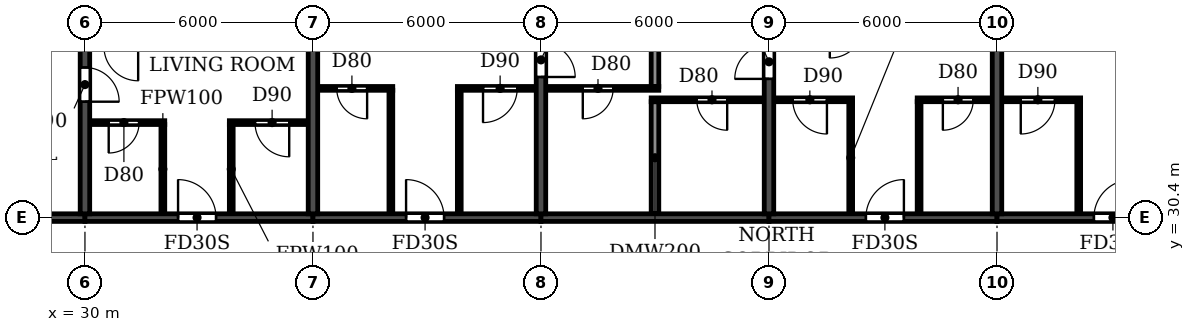
"""IFC4 building model, lengths in metres.
Left out: names, types, materials, properties, quantities, classifications, styles, units other than length and angle.
Written with IfcOpenShell. Run it as: python <this file> out.ifc"""

import sys

from ifc_helpers import new_model, si_unit, direction, frame, frame_2d, origin, place, context, subcontext, project, spatial, rectangle, extrude, element, fill, save


model = new_model("IFC4")
c1 = context("Model", 3, precision=1e-05, world=origin(), true_north=direction((0.0, 1.0)))
c2 = subcontext(c1, "Body", "Model", "MODEL_VIEW")
j1 = project(units=[si_unit("LENGTHUNIT", "METRE"), si_unit("PLANEANGLEUNIT", "RADIAN")], contexts=[c1])
p1 = place(None, origin())
s1 = spatial("IfcSite", under=j1, at=p1, CompositionType="ELEMENT")
p2 = place(p1, origin())
s2 = spatial("IfcBuilding", under=s1, at=p2, CompositionType="ELEMENT")
p3 = place(p2, frame((0.0, 0.0, 251.1)))
s3 = spatial("IfcBuildingStorey", under=s2, at=p3, CompositionType="ELEMENT", Elevation=251.1)
p4 = place(p3, frame((30.0, 30.5, 0.0), z_axis=(0.0, 0.0, 1.0), x_axis=(0.0, 1.0, 0.0)))
e1 = element("IfcWall", 1, at=p4, inside=s3, PredefinedType="SHEAR", context=c2, shape_type="SweptSolid", body=[
    extrude(rectangle(XDim=10.5, YDim=0.25, at=frame_2d((5.25, 0.0))), origin(), (0.0, 0.0, 1.0), 3.08),
])
p5 = place(p4, frame((2.95, 0.0, 0.0)))
e2 = element("IfcOpeningElement", 2, at=p5, cuts=e1, PredefinedType="OPENING", context=c2, shape_type="SweptSolid", body=[
    extrude(rectangle(XDim=0.9, YDim=2.1, at=frame_2d((0.45, 1.05))), frame((0.0, 0.135, 0.0), z_axis=(0.0, -1.0, 0.0), x_axis=(1.0, 0.0, 0.0)), (0.0, 0.0, 1.0), 0.27),
])
p6 = place(p3, frame((36.0, 30.5, 0.0), z_axis=(0.0, 0.0, 1.0), x_axis=(0.0, 1.0, 0.0)))
e3 = element("IfcWall", 3, at=p6, inside=s3, PredefinedType="SHEAR", context=c2, shape_type="SweptSolid", body=[
    extrude(rectangle(XDim=10.5, YDim=0.25, at=frame_2d((5.25, 0.0))), origin(), (0.0, 0.0, 1.0), 3.08),
])
p7 = place(p3, frame((42.0, 30.5, 0.0), z_axis=(0.0, 0.0, 1.0), x_axis=(0.0, 1.0, 0.0)))
e4 = element("IfcWall", 4, at=p7, inside=s3, PredefinedType="SHEAR", context=c2, shape_type="SweptSolid", body=[
    extrude(rectangle(XDim=10.5, YDim=0.25, at=frame_2d((5.25, 0.0))), origin(), (0.0, 0.0, 1.0), 3.08),
])
p8 = place(p7, frame((3.6, 0.0, 0.0)))
e5 = element("IfcOpeningElement", 5, at=p8, cuts=e4, PredefinedType="OPENING", context=c2, shape_type="SweptSolid", body=[
    extrude(rectangle(XDim=0.9, YDim=2.1, at=frame_2d((0.45, 1.05))), frame((0.0, 0.135, 0.0), z_axis=(0.0, -1.0, 0.0), x_axis=(1.0, 0.0, 0.0)), (0.0, 0.0, 1.0), 0.27),
])
p9 = place(p3, frame((48.0, 30.5, 0.0), z_axis=(0.0, 0.0, 1.0), x_axis=(0.0, 1.0, 0.0)))
e6 = element("IfcWall", 6, at=p9, inside=s3, PredefinedType="SHEAR", context=c2, shape_type="SweptSolid", body=[
    extrude(rectangle(XDim=10.5, YDim=0.25, at=frame_2d((5.25, 0.0))), origin(), (0.0, 0.0, 1.0), 3.08),
])
p10 = place(p9, frame((3.55, 0.0, 0.0)))
e7 = element("IfcOpeningElement", 7, at=p10, cuts=e6, PredefinedType="OPENING", context=c2, shape_type="SweptSolid", body=[
    extrude(rectangle(XDim=0.9, YDim=2.1, at=frame_2d((0.45, 1.05))), frame((0.0, 0.135, 0.0), z_axis=(0.0, -1.0, 0.0), x_axis=(1.0, 0.0, 0.0)), (0.0, 0.0, 1.0), 0.27),
])
p11 = place(p3, frame((54.0, 30.5, 0.0), z_axis=(0.0, 0.0, 1.0), x_axis=(0.0, 1.0, 0.0)))
e8 = element("IfcWall", 8, at=p11, inside=s3, PredefinedType="SHEAR", context=c2, shape_type="SweptSolid", body=[
    extrude(rectangle(XDim=10.5, YDim=0.25, at=frame_2d((5.25, 0.0))), origin(), (0.0, 0.0, 1.0), 3.08),
])
p12 = place(p3, frame((24.0, 30.4, 0.0), z_axis=(0.0, 0.0, 1.0), x_axis=(1.0, 0.0, 0.0)))
e9 = element("IfcWall", 9, at=p12, inside=s3, PredefinedType="SHEAR", context=c2, shape_type="SweptSolid", body=[
    extrude(rectangle(XDim=6.0, YDim=0.2, at=frame_2d((3.0, 0.0))), origin(), (0.0, 0.0, 1.0), 2.48),
])
p13 = place(p3, frame((30.0, 30.4, 0.0), z_axis=(0.0, 0.0, 1.0), x_axis=(1.0, 0.0, 0.0)))
e10 = element("IfcWall", 10, at=p13, inside=s3, PredefinedType="SHEAR", context=c2, shape_type="SweptSolid", body=[
    extrude(rectangle(XDim=6.0, YDim=0.2, at=frame_2d((3.0, 0.0))), origin(), (0.0, 0.0, 1.0), 2.48),
])
p14 = place(p13, frame((2.45, 0.0, 0.0)))
e11 = element("IfcOpeningElement", 11, at=p14, cuts=e10, PredefinedType="OPENING", context=c2, shape_type="SweptSolid", body=[
    extrude(rectangle(XDim=1.0, YDim=2.1, at=frame_2d((0.5, 1.05))), frame((0.0, 0.11, 0.0), z_axis=(0.0, -1.0, 0.0), x_axis=(1.0, 0.0, 0.0)), (0.0, 0.0, 1.0), 0.22),
])
p15 = place(p3, frame((36.0, 30.4, 0.0), z_axis=(0.0, 0.0, 1.0), x_axis=(1.0, 0.0, 0.0)))
e12 = element("IfcWall", 12, at=p15, inside=s3, PredefinedType="SHEAR", context=c2, shape_type="SweptSolid", body=[
    extrude(rectangle(XDim=6.0, YDim=0.2, at=frame_2d((3.0, 0.0))), origin(), (0.0, 0.0, 1.0), 2.48),
])
p16 = place(p15, frame((2.45, 0.0, 0.0)))
e13 = element("IfcOpeningElement", 13, at=p16, cuts=e12, PredefinedType="OPENING", context=c2, shape_type="SweptSolid", body=[
    extrude(rectangle(XDim=1.0, YDim=2.1, at=frame_2d((0.5, 1.05))), frame((0.0, 0.11, 0.0), z_axis=(0.0, -1.0, 0.0), x_axis=(1.0, 0.0, 0.0)), (0.0, 0.0, 1.0), 0.22),
])
p17 = place(p3, frame((42.0, 30.4, 0.0), z_axis=(0.0, 0.0, 1.0), x_axis=(1.0, 0.0, 0.0)))
e14 = element("IfcWall", 14, at=p17, inside=s3, PredefinedType="SHEAR", context=c2, shape_type="SweptSolid", body=[
    extrude(rectangle(XDim=6.0, YDim=0.2, at=frame_2d((3.0, 0.0))), origin(), (0.0, 0.0, 1.0), 2.48),
])
p18 = place(p3, frame((48.0, 30.4, 0.0), z_axis=(0.0, 0.0, 1.0), x_axis=(1.0, 0.0, 0.0)))
e15 = element("IfcWall", 15, at=p18, inside=s3, PredefinedType="SHEAR", context=c2, shape_type="SweptSolid", body=[
    extrude(rectangle(XDim=6.0, YDim=0.2, at=frame_2d((3.0, 0.0))), origin(), (0.0, 0.0, 1.0), 2.48),
])
p19 = place(p18, frame((2.55, 0.0, 0.0)))
e16 = element("IfcOpeningElement", 16, at=p19, cuts=e15, PredefinedType="OPENING", context=c2, shape_type="SweptSolid", body=[
    extrude(rectangle(XDim=1.0, YDim=2.1, at=frame_2d((0.5, 1.05))), frame((0.0, 0.11, 0.0), z_axis=(0.0, -1.0, 0.0), x_axis=(1.0, 0.0, 0.0)), (0.0, 0.0, 1.0), 0.22),
])
p20 = place(p3, frame((54.0, 30.4, 0.0), z_axis=(0.0, 0.0, 1.0), x_axis=(1.0, 0.0, 0.0)))
e17 = element("IfcWall", 17, at=p20, inside=s3, PredefinedType="SHEAR", context=c2, shape_type="SweptSolid", body=[
    extrude(rectangle(XDim=6.0, YDim=0.2, at=frame_2d((3.0, 0.0))), origin(), (0.0, 0.0, 1.0), 2.48),
])
p21 = place(p20, frame((2.55, 0.0, 0.0)))
e18 = element("IfcOpeningElement", 18, at=p21, cuts=e17, PredefinedType="OPENING", context=c2, shape_type="SweptSolid", body=[
    extrude(rectangle(XDim=1.0, YDim=2.1, at=frame_2d((0.5, 1.05))), frame((0.0, 0.11, 0.0), z_axis=(0.0, -1.0, 0.0), x_axis=(1.0, 0.0, 0.0)), (0.0, 0.0, 1.0), 0.22),
])
p22 = place(p3, frame((45.0, 30.51, 0.0), z_axis=(0.0, 0.0, 1.0), x_axis=(0.0, 1.0, 0.0)))
e19 = element("IfcWall", 19, at=p22, inside=s3, PredefinedType="PARTITIONING", context=c2, shape_type="SweptSolid", body=[
    extrude(rectangle(XDim=2.94, YDim=0.2, at=frame_2d((1.47, 0.0))), origin(), (0.0, 0.0, 1.0), 3.08),
])
p23 = place(p3, frame((45.0, 33.85, 0.0), z_axis=(0.0, 0.0, 1.0), x_axis=(0.0, 1.0, 0.0)))
e20 = element("IfcWall", 20, at=p23, inside=s3, PredefinedType="PARTITIONING", context=c2, shape_type="SweptSolid", body=[
    extrude(rectangle(XDim=7.29, YDim=0.2, at=frame_2d((3.645, 0.0))), origin(), (0.0, 0.0, 1.0), 3.08),
])
p24 = place(p3, frame((30.135, 32.9, 0.0), z_axis=(0.0, 0.0, 1.0), x_axis=(1.0, 0.0, 0.0)))
e21 = element("IfcWall", 21, at=p24, inside=s3, PredefinedType="PARTITIONING", context=c2, shape_type="SweptSolid", body=[
    extrude(rectangle(XDim=1.965, YDim=0.1, at=frame_2d((0.982, 0.0))), origin(), (0.0, 0.0, 1.0), 3.08),
])
p25 = place(p24, frame((0.49, 0.0, 0.0)))
e22 = element("IfcOpeningElement", 22, at=p25, cuts=e21, PredefinedType="OPENING", context=c2, shape_type="SweptSolid", body=[
    extrude(rectangle(XDim=0.8, YDim=2.1, at=frame_2d((0.4, 1.05))), frame((0.0, 0.06, 0.0), z_axis=(0.0, -1.0, 0.0), x_axis=(1.0, 0.0, 0.0)), (0.0, 0.0, 1.0), 0.12),
])
p26 = place(p3, frame((33.8, 32.9, 0.0), z_axis=(0.0, 0.0, 1.0), x_axis=(1.0, 0.0, 0.0)))
e23 = element("IfcWall", 23, at=p26, inside=s3, PredefinedType="PARTITIONING", context=c2, shape_type="SweptSolid", body=[
    extrude(rectangle(XDim=2.065, YDim=0.1, at=frame_2d((1.032, 0.0))), origin(), (0.0, 0.0, 1.0), 3.08),
])
p27 = place(p26, frame((0.675, 0.0, 0.0)))
e24 = element("IfcOpeningElement", 24, at=p27, cuts=e23, PredefinedType="OPENING", context=c2, shape_type="SweptSolid", body=[
    extrude(rectangle(XDim=0.9, YDim=2.1, at=frame_2d((0.45, 1.05))), frame((0.0, 0.06, 0.0), z_axis=(0.0, -1.0, 0.0), x_axis=(1.0, 0.0, 0.0)), (0.0, 0.0, 1.0), 0.12),
])
p28 = place(p3, frame((44.9, 33.5, 0.0), z_axis=(0.0, 0.0, 1.0), x_axis=(1.0, 0.0, 0.0)))
e25 = element("IfcWall", 25, at=p28, inside=s3, PredefinedType="PARTITIONING", context=c2, shape_type="SweptSolid", body=[
    extrude(rectangle(XDim=2.965, YDim=0.1, at=frame_2d((1.482, 0.0))), origin(), (0.0, 0.0, 1.0), 3.08),
])
p29 = place(p28, frame((1.2, 0.0, 0.0)))
e26 = element("IfcOpeningElement", 26, at=p29, cuts=e25, PredefinedType="OPENING", context=c2, shape_type="SweptSolid", body=[
    extrude(rectangle(XDim=0.8, YDim=2.1, at=frame_2d((0.4, 1.05))), frame((0.0, 0.06, 0.0), z_axis=(0.0, -1.0, 0.0), x_axis=(1.0, 0.0, 0.0)), (0.0, 0.0, 1.0), 0.12),
])
p30 = place(p3, frame((48.135, 33.5, 0.0), z_axis=(0.0, 0.0, 1.0), x_axis=(1.0, 0.0, 0.0)))
e27 = element("IfcWall", 27, at=p30, inside=s3, PredefinedType="PARTITIONING", context=c2, shape_type="SweptSolid", body=[
    extrude(rectangle(XDim=2.065, YDim=0.1, at=frame_2d((1.032, 0.0))), origin(), (0.0, 0.0, 1.0), 3.08),
])
p31 = place(p30, frame((0.49, 0.0, 0.0)))
e28 = element("IfcOpeningElement", 28, at=p31, cuts=e27, PredefinedType="OPENING", context=c2, shape_type="SweptSolid", body=[
    extrude(rectangle(XDim=0.9, YDim=2.1, at=frame_2d((0.45, 1.05))), frame((0.0, 0.06, 0.0), z_axis=(0.0, -1.0, 0.0), x_axis=(1.0, 0.0, 0.0)), (0.0, 0.0, 1.0), 0.12),
])
p32 = place(p3, frame((51.9, 33.5, 0.0), z_axis=(0.0, 0.0, 1.0), x_axis=(1.0, 0.0, 0.0)))
e29 = element("IfcWall", 29, at=p32, inside=s3, PredefinedType="PARTITIONING", context=c2, shape_type="SweptSolid", body=[
    extrude(rectangle(XDim=1.965, YDim=0.1, at=frame_2d((0.982, 0.0))), origin(), (0.0, 0.0, 1.0), 3.08),
])
p33 = place(p32, frame((0.675, 0.0, 0.0)))
e30 = element("IfcOpeningElement", 30, at=p33, cuts=e29, PredefinedType="OPENING", context=c2, shape_type="SweptSolid", body=[
    extrude(rectangle(XDim=0.8, YDim=2.1, at=frame_2d((0.4, 1.05))), frame((0.0, 0.06, 0.0), z_axis=(0.0, -1.0, 0.0), x_axis=(1.0, 0.0, 0.0)), (0.0, 0.0, 1.0), 0.12),
])
p34 = place(p3, frame((54.135, 33.5, 0.0), z_axis=(0.0, 0.0, 1.0), x_axis=(1.0, 0.0, 0.0)))
e31 = element("IfcWall", 31, at=p34, inside=s3, PredefinedType="PARTITIONING", context=c2, shape_type="SweptSolid", body=[
    extrude(rectangle(XDim=2.065, YDim=0.1, at=frame_2d((1.032, 0.0))), origin(), (0.0, 0.0, 1.0), 3.08),
])
p35 = place(p34, frame((0.49, 0.0, 0.0)))
e32 = element("IfcOpeningElement", 32, at=p35, cuts=e31, PredefinedType="OPENING", context=c2, shape_type="SweptSolid", body=[
    extrude(rectangle(XDim=0.9, YDim=2.1, at=frame_2d((0.45, 1.05))), frame((0.0, 0.06, 0.0), z_axis=(0.0, -1.0, 0.0), x_axis=(1.0, 0.0, 0.0)), (0.0, 0.0, 1.0), 0.12),
])
p36 = place(p3, frame((36.135, 33.8, 0.0), z_axis=(0.0, 0.0, 1.0), x_axis=(1.0, 0.0, 0.0)))
e33 = element("IfcWall", 33, at=p36, inside=s3, PredefinedType="PARTITIONING", context=c2, shape_type="SweptSolid", body=[
    extrude(rectangle(XDim=1.965, YDim=0.1, at=frame_2d((0.982, 0.0))), origin(), (0.0, 0.0, 1.0), 3.08),
])
p37 = place(p36, frame((0.49, 0.0, 0.0)))
e34 = element("IfcOpeningElement", 34, at=p37, cuts=e33, PredefinedType="OPENING", context=c2, shape_type="SweptSolid", body=[
    extrude(rectangle(XDim=0.8, YDim=2.1, at=frame_2d((0.4, 1.05))), frame((0.0, 0.06, 0.0), z_axis=(0.0, -1.0, 0.0), x_axis=(1.0, 0.0, 0.0)), (0.0, 0.0, 1.0), 0.12),
])
p38 = place(p3, frame((39.8, 33.8, 0.0), z_axis=(0.0, 0.0, 1.0), x_axis=(1.0, 0.0, 0.0)))
e35 = element("IfcWall", 35, at=p38, inside=s3, PredefinedType="PARTITIONING", context=c2, shape_type="SweptSolid", body=[
    extrude(rectangle(XDim=2.065, YDim=0.1, at=frame_2d((1.032, 0.0))), origin(), (0.0, 0.0, 1.0), 3.08),
])
p39 = place(p38, frame((0.675, 0.0, 0.0)))
e36 = element("IfcOpeningElement", 36, at=p39, cuts=e35, PredefinedType="OPENING", context=c2, shape_type="SweptSolid", body=[
    extrude(rectangle(XDim=0.9, YDim=2.1, at=frame_2d((0.45, 1.05))), frame((0.0, 0.06, 0.0), z_axis=(0.0, -1.0, 0.0), x_axis=(1.0, 0.0, 0.0)), (0.0, 0.0, 1.0), 0.12),
])
p40 = place(p3, frame((42.135, 33.8, 0.0), z_axis=(0.0, 0.0, 1.0), x_axis=(1.0, 0.0, 0.0)))
e37 = element("IfcWall", 37, at=p40, inside=s3, PredefinedType="PARTITIONING", context=c2, shape_type="SweptSolid", body=[
    extrude(rectangle(XDim=2.965, YDim=0.1, at=frame_2d((1.482, 0.0))), origin(), (0.0, 0.0, 1.0), 3.08),
])
p41 = place(p40, frame((0.965, 0.0, 0.0)))
e38 = element("IfcOpeningElement", 38, at=p41, cuts=e37, PredefinedType="OPENING", context=c2, shape_type="SweptSolid", body=[
    extrude(rectangle(XDim=0.8, YDim=2.1, at=frame_2d((0.4, 1.05))), frame((0.0, 0.06, 0.0), z_axis=(0.0, -1.0, 0.0), x_axis=(1.0, 0.0, 0.0)), (0.0, 0.0, 1.0), 0.12),
])
for number, where, z_axis, x_axis in (
    (39, (32.05, 30.51, 0.0), (0.0, 0.0, 1.0), (0.0, 1.0, 0.0)),
    (40, (33.85, 30.51, 0.0), (0.0, 0.0, 1.0), (0.0, 1.0, 0.0)),
):
    element("IfcWall", number, at=place(p3, frame(where, z_axis=z_axis, x_axis=x_axis)), inside=s3, PredefinedType="PARTITIONING", context=c2, shape_type="SweptSolid", body=[
        extrude(rectangle(XDim=2.34, YDim=0.1, at=frame_2d((1.17, 0.0))), origin(), (0.0, 0.0, 1.0), 3.08),
    ])
for number, where, z_axis, x_axis in (
    (41, (38.05, 30.51, 0.0), (0.0, 0.0, 1.0), (0.0, 1.0, 0.0)),
    (42, (39.85, 30.51, 0.0), (0.0, 0.0, 1.0), (0.0, 1.0, 0.0)),
):
    element("IfcWall", number, at=place(p3, frame(where, z_axis=z_axis, x_axis=x_axis)), inside=s3, PredefinedType="PARTITIONING", context=c2, shape_type="SweptSolid", body=[
        extrude(rectangle(XDim=3.24, YDim=0.1, at=frame_2d((1.62, 0.0))), origin(), (0.0, 0.0, 1.0), 3.08),
    ])
for number, where, z_axis, x_axis in (
    (43, (50.15, 30.51, 0.0), (0.0, 0.0, 1.0), (0.0, 1.0, 0.0)),
    (44, (51.95, 30.51, 0.0), (0.0, 0.0, 1.0), (0.0, 1.0, 0.0)),
    (45, (56.15, 30.51, 0.0), (0.0, 0.0, 1.0), (0.0, 1.0, 0.0)),
):
    element("IfcWall", number, at=place(p3, frame(where, z_axis=z_axis, x_axis=x_axis)), inside=s3, PredefinedType="PARTITIONING", context=c2, shape_type="SweptSolid", body=[
        extrude(rectangle(XDim=2.94, YDim=0.1, at=frame_2d((1.47, 0.0))), origin(), (0.0, 0.0, 1.0), 3.08),
    ])
p42 = place(p5, frame((0.9, 0.0, 0.0), z_axis=(0.0, 0.0, 1.0), x_axis=(-1.0, 0.0, 0.0)))
e46 = element("IfcDoor", 46, at=p42, inside=s3, OperationType="SINGLE_SWING_RIGHT", PredefinedType="DOOR", context=c2, shape_type="SweptSolid", body=[
    extrude(rectangle(XDim=0.9, YDim=2.1, at=frame_2d((0.45, 1.05))), frame((0.0, 0.025, 0.0), z_axis=(0.0, -1.0, 0.0), x_axis=(1.0, 0.0, 0.0)), (0.0, 0.0, 1.0), 0.05),
])
fill(e2, e46)
p43 = place(p25, frame((0.8, 0.0, 0.0), z_axis=(0.0, 0.0, 1.0), x_axis=(-1.0, 0.0, 0.0)))
e47 = element("IfcDoor", 47, at=p43, inside=s3, OperationType="SINGLE_SWING_RIGHT", PredefinedType="DOOR", context=c2, shape_type="SweptSolid", body=[
    extrude(rectangle(XDim=0.8, YDim=2.1, at=frame_2d((0.4, 1.05))), frame((0.0, 0.025, 0.0), z_axis=(0.0, -1.0, 0.0), x_axis=(1.0, 0.0, 0.0)), (0.0, 0.0, 1.0), 0.05),
])
fill(e22, e47)
p44 = place(p14, origin())
e48 = element("IfcDoor", 48, at=p44, inside=s3, OperationType="SINGLE_SWING_LEFT", PredefinedType="DOOR", context=c2, shape_type="SweptSolid", body=[
    extrude(rectangle(XDim=1.0, YDim=2.1, at=frame_2d((0.5, 1.05))), frame((0.0, 0.025, 0.0), z_axis=(0.0, -1.0, 0.0), x_axis=(1.0, 0.0, 0.0)), (0.0, 0.0, 1.0), 0.05),
])
fill(e11, e48)
p45 = place(p27, frame((0.9, 0.0, 0.0), z_axis=(0.0, 0.0, 1.0), x_axis=(-1.0, 0.0, 0.0)))
e49 = element("IfcDoor", 49, at=p45, inside=s3, OperationType="SINGLE_SWING_LEFT", PredefinedType="DOOR", context=c2, shape_type="SweptSolid", body=[
    extrude(rectangle(XDim=0.9, YDim=2.1, at=frame_2d((0.45, 1.05))), frame((0.0, 0.025, 0.0), z_axis=(0.0, -1.0, 0.0), x_axis=(1.0, 0.0, 0.0)), (0.0, 0.0, 1.0), 0.05),
])
fill(e24, e49)
p46 = place(p41, frame((0.8, 0.0, 0.0), z_axis=(0.0, 0.0, 1.0), x_axis=(-1.0, 0.0, 0.0)))
e50 = element("IfcDoor", 50, at=p46, inside=s3, OperationType="SINGLE_SWING_RIGHT", PredefinedType="DOOR", context=c2, shape_type="SweptSolid", body=[
    extrude(rectangle(XDim=0.8, YDim=2.1, at=frame_2d((0.4, 1.05))), frame((0.0, 0.025, 0.0), z_axis=(0.0, -1.0, 0.0), x_axis=(1.0, 0.0, 0.0)), (0.0, 0.0, 1.0), 0.05),
])
fill(e38, e50)
p47 = place(p37, frame((0.8, 0.0, 0.0), z_axis=(0.0, 0.0, 1.0), x_axis=(-1.0, 0.0, 0.0)))
e51 = element("IfcDoor", 51, at=p47, inside=s3, OperationType="SINGLE_SWING_LEFT", PredefinedType="DOOR", context=c2, shape_type="SweptSolid", body=[
    extrude(rectangle(XDim=0.8, YDim=2.1, at=frame_2d((0.4, 1.05))), frame((0.0, 0.025, 0.0), z_axis=(0.0, -1.0, 0.0), x_axis=(1.0, 0.0, 0.0)), (0.0, 0.0, 1.0), 0.05),
])
fill(e34, e51)
p48 = place(p16, origin())
e52 = element("IfcDoor", 52, at=p48, inside=s3, OperationType="SINGLE_SWING_LEFT", PredefinedType="DOOR", context=c2, shape_type="SweptSolid", body=[
    extrude(rectangle(XDim=1.0, YDim=2.1, at=frame_2d((0.5, 1.05))), frame((0.0, 0.025, 0.0), z_axis=(0.0, -1.0, 0.0), x_axis=(1.0, 0.0, 0.0)), (0.0, 0.0, 1.0), 0.05),
])
fill(e13, e52)
p49 = place(p39, frame((0.9, 0.0, 0.0), z_axis=(0.0, 0.0, 1.0), x_axis=(-1.0, 0.0, 0.0)))
e53 = element("IfcDoor", 53, at=p49, inside=s3, OperationType="SINGLE_SWING_RIGHT", PredefinedType="DOOR", context=c2, shape_type="SweptSolid", body=[
    extrude(rectangle(XDim=0.9, YDim=2.1, at=frame_2d((0.45, 1.05))), frame((0.0, 0.025, 0.0), z_axis=(0.0, -1.0, 0.0), x_axis=(1.0, 0.0, 0.0)), (0.0, 0.0, 1.0), 0.05),
])
fill(e36, e53)
p50 = place(p8, frame((0.9, 0.0, 0.0), z_axis=(0.0, 0.0, 1.0), x_axis=(-1.0, 0.0, 0.0)))
e54 = element("IfcDoor", 54, at=p50, inside=s3, OperationType="SINGLE_SWING_RIGHT", PredefinedType="DOOR", context=c2, shape_type="SweptSolid", body=[
    extrude(rectangle(XDim=0.9, YDim=2.1, at=frame_2d((0.45, 1.05))), frame((0.0, 0.025, 0.0), z_axis=(0.0, -1.0, 0.0), x_axis=(1.0, 0.0, 0.0)), (0.0, 0.0, 1.0), 0.05),
])
fill(e5, e54)
p51 = place(p29, frame((0.8, 0.0, 0.0), z_axis=(0.0, 0.0, 1.0), x_axis=(-1.0, 0.0, 0.0)))
e55 = element("IfcDoor", 55, at=p51, inside=s3, OperationType="SINGLE_SWING_LEFT", PredefinedType="DOOR", context=c2, shape_type="SweptSolid", body=[
    extrude(rectangle(XDim=0.8, YDim=2.1, at=frame_2d((0.4, 1.05))), frame((0.0, 0.025, 0.0), z_axis=(0.0, -1.0, 0.0), x_axis=(1.0, 0.0, 0.0)), (0.0, 0.0, 1.0), 0.05),
])
fill(e26, e55)
p52 = place(p10, origin())
e56 = element("IfcDoor", 56, at=p52, inside=s3, OperationType="SINGLE_SWING_LEFT", PredefinedType="DOOR", context=c2, shape_type="SweptSolid", body=[
    extrude(rectangle(XDim=0.9, YDim=2.1, at=frame_2d((0.45, 1.05))), frame((0.0, 0.025, 0.0), z_axis=(0.0, -1.0, 0.0), x_axis=(1.0, 0.0, 0.0)), (0.0, 0.0, 1.0), 0.05),
])
fill(e7, e56)
p53 = place(p31, frame((0.9, 0.0, 0.0), z_axis=(0.0, 0.0, 1.0), x_axis=(-1.0, 0.0, 0.0)))
e57 = element("IfcDoor", 57, at=p53, inside=s3, OperationType="SINGLE_SWING_LEFT", PredefinedType="DOOR", context=c2, shape_type="SweptSolid", body=[
    extrude(rectangle(XDim=0.9, YDim=2.1, at=frame_2d((0.45, 1.05))), frame((0.0, 0.025, 0.0), z_axis=(0.0, -1.0, 0.0), x_axis=(1.0, 0.0, 0.0)), (0.0, 0.0, 1.0), 0.05),
])
fill(e28, e57)
p54 = place(p19, origin())
e58 = element("IfcDoor", 58, at=p54, inside=s3, OperationType="SINGLE_SWING_RIGHT", PredefinedType="DOOR", context=c2, shape_type="SweptSolid", body=[
    extrude(rectangle(XDim=1.0, YDim=2.1, at=frame_2d((0.5, 1.05))), frame((0.0, 0.025, 0.0), z_axis=(0.0, -1.0, 0.0), x_axis=(1.0, 0.0, 0.0)), (0.0, 0.0, 1.0), 0.05),
])
fill(e16, e58)
p55 = place(p33, frame((0.8, 0.0, 0.0), z_axis=(0.0, 0.0, 1.0), x_axis=(-1.0, 0.0, 0.0)))
e59 = element("IfcDoor", 59, at=p55, inside=s3, OperationType="SINGLE_SWING_RIGHT", PredefinedType="DOOR", context=c2, shape_type="SweptSolid", body=[
    extrude(rectangle(XDim=0.8, YDim=2.1, at=frame_2d((0.4, 1.05))), frame((0.0, 0.025, 0.0), z_axis=(0.0, -1.0, 0.0), x_axis=(1.0, 0.0, 0.0)), (0.0, 0.0, 1.0), 0.05),
])
fill(e30, e59)
p56 = place(p35, frame((0.9, 0.0, 0.0), z_axis=(0.0, 0.0, 1.0), x_axis=(-1.0, 0.0, 0.0)))
e60 = element("IfcDoor", 60, at=p56, inside=s3, OperationType="SINGLE_SWING_RIGHT", PredefinedType="DOOR", context=c2, shape_type="SweptSolid", body=[
    extrude(rectangle(XDim=0.9, YDim=2.1, at=frame_2d((0.45, 1.05))), frame((0.0, 0.025, 0.0), z_axis=(0.0, -1.0, 0.0), x_axis=(1.0, 0.0, 0.0)), (0.0, 0.0, 1.0), 0.05),
])
fill(e32, e60)
p57 = place(p21, origin())
e61 = element("IfcDoor", 61, at=p57, inside=s3, OperationType="SINGLE_SWING_RIGHT", PredefinedType="DOOR", context=c2, shape_type="SweptSolid", body=[
    extrude(rectangle(XDim=1.0, YDim=2.1, at=frame_2d((0.5, 1.05))), frame((0.0, 0.025, 0.0), z_axis=(0.0, -1.0, 0.0), x_axis=(1.0, 0.0, 0.0)), (0.0, 0.0, 1.0), 0.05),
])
fill(e18, e61)
save(model, sys.argv[1])
